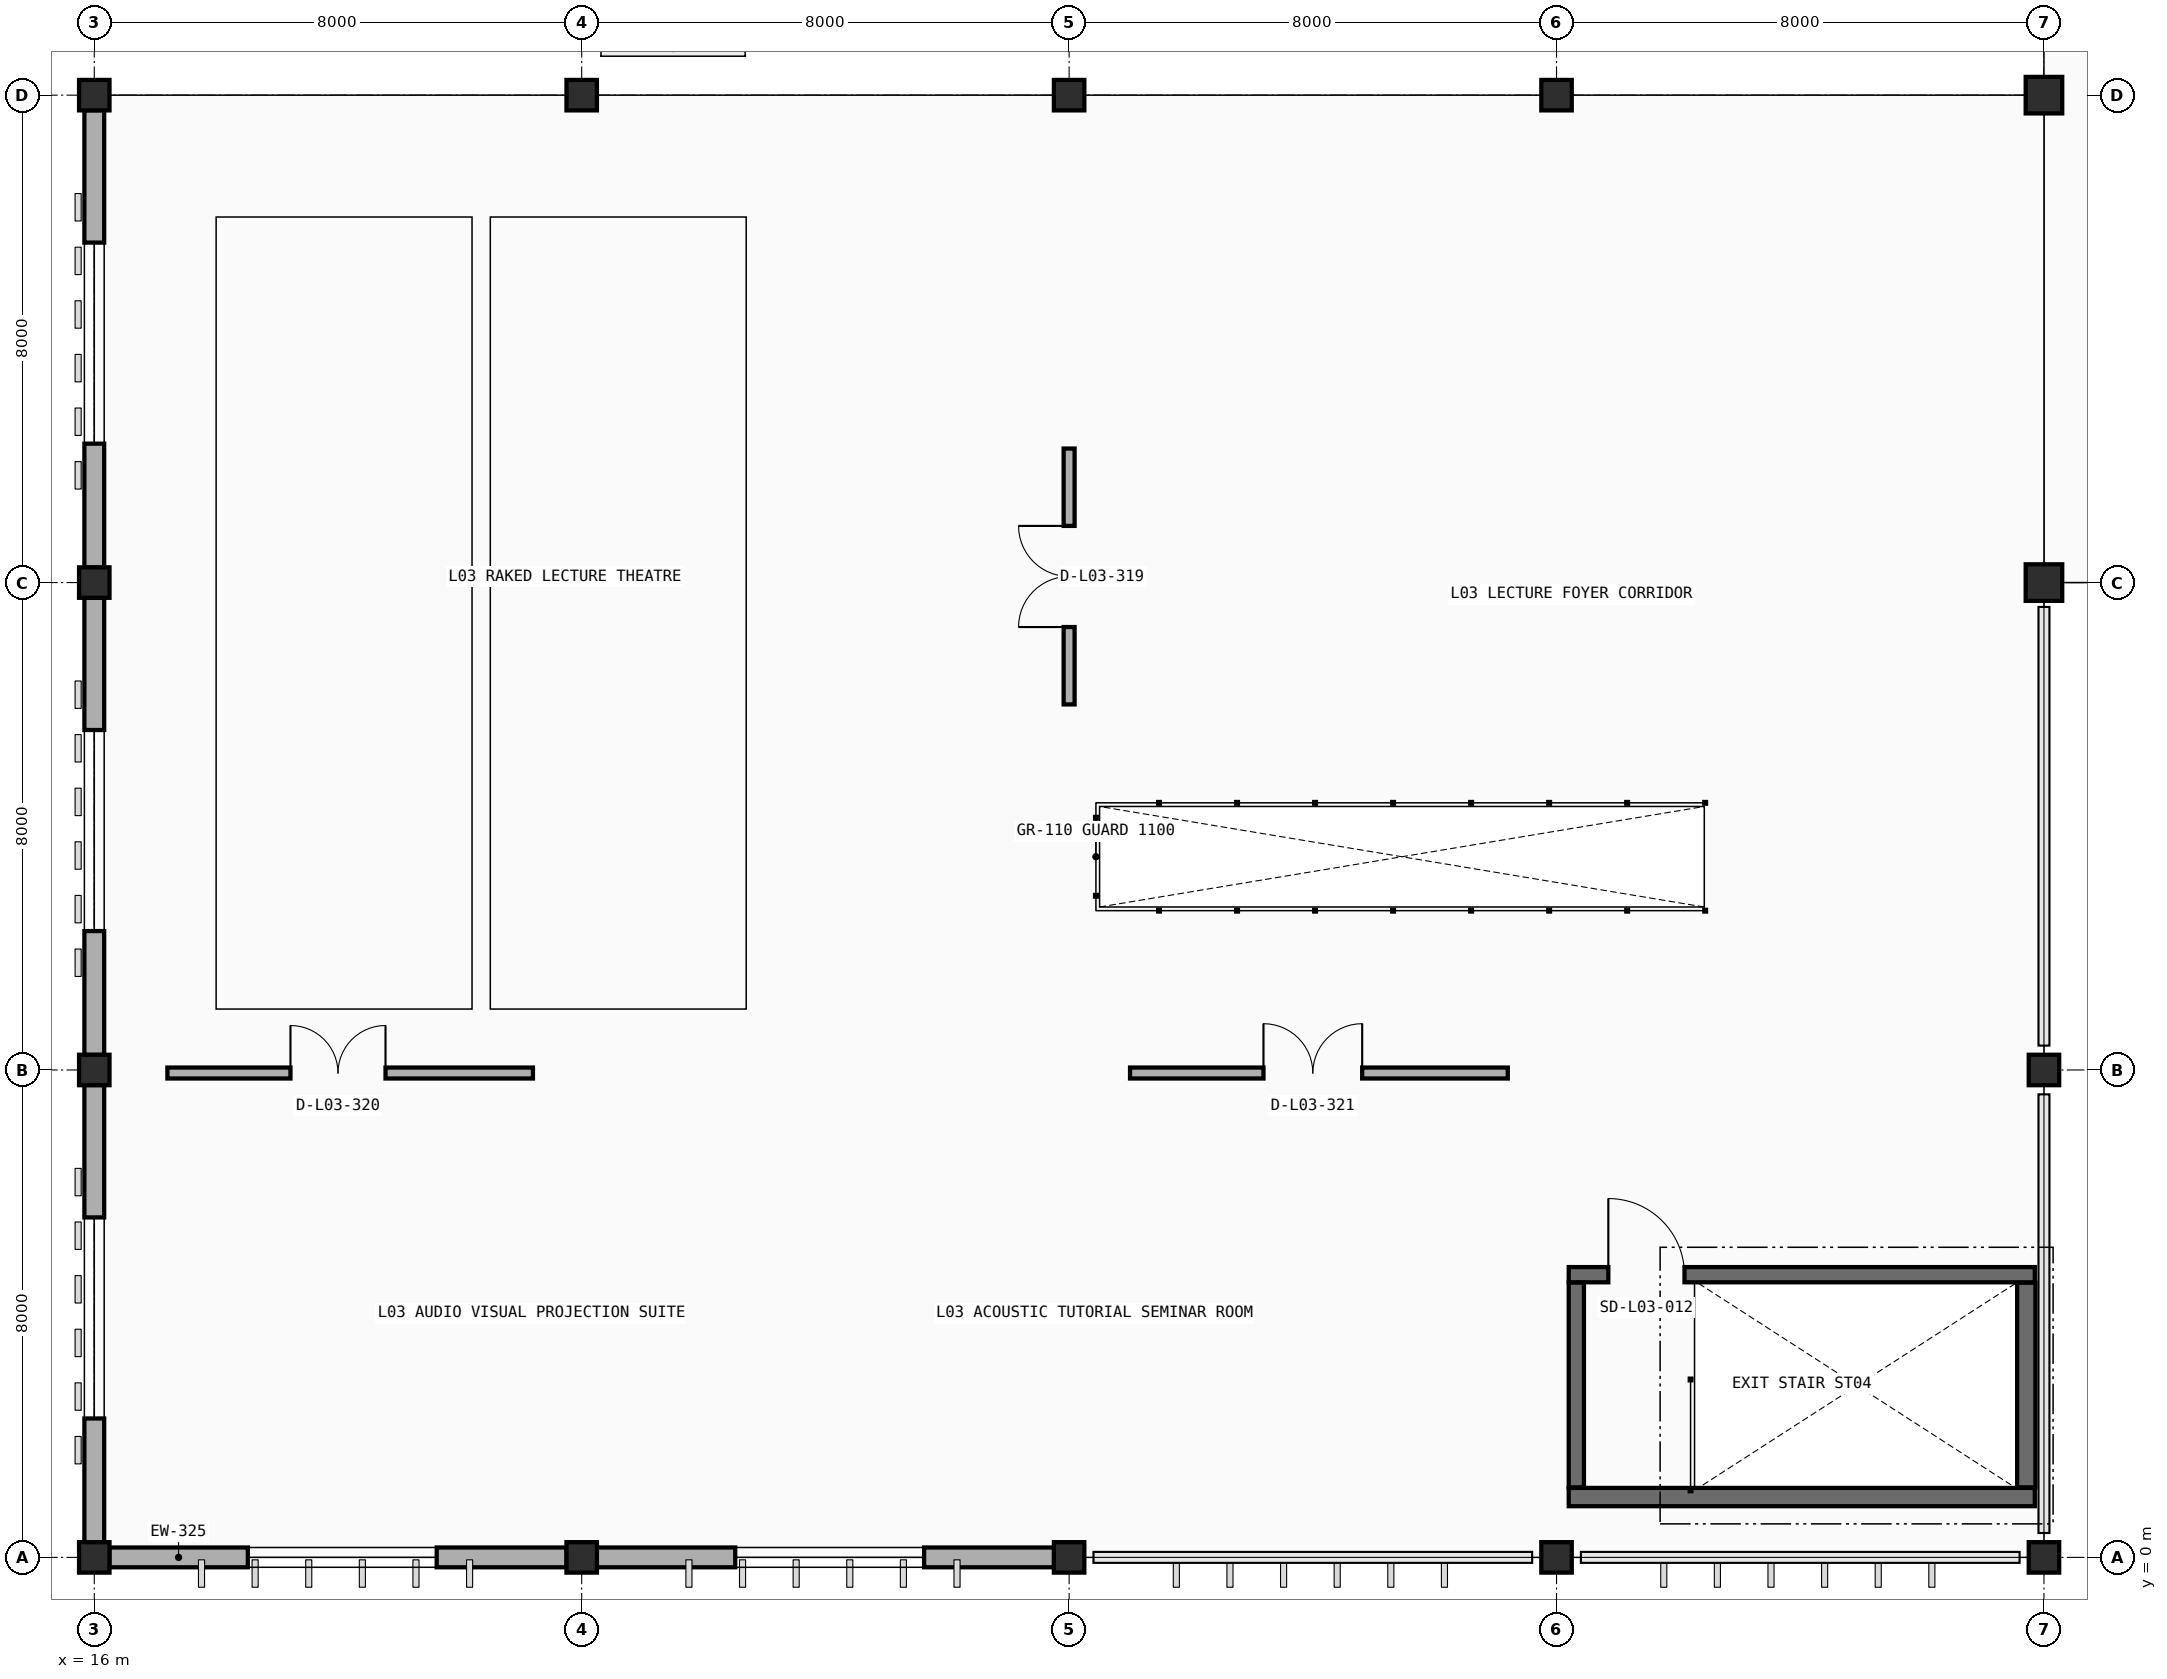
"""IFC4 building model, lengths in metres.
Left out: names, types, materials, properties, quantities, classifications, styles, units other than length and angle.
Written with IfcOpenShell. Run it as: python <this file> out.ifc"""

import sys

from ifc_helpers import new_model, si_unit, direction, frame, frame_2d, origin, origin_2d, place, context, subcontext, project, spatial, rectangle, extrude, element, fill, save


model = new_model("IFC4")
c1 = context("Model", 3, precision=1e-05, world=origin(), true_north=direction((0.0, 1.0)))
c2 = subcontext(c1, "Body", "Model", "MODEL_VIEW")
j1 = project(units=[si_unit("LENGTHUNIT", "METRE"), si_unit("PLANEANGLEUNIT", "RADIAN")], contexts=[c1])
p1 = place(None, origin())
s1 = spatial("IfcSite", under=j1, at=p1, CompositionType="ELEMENT")
p2 = place(p1, origin())
s2 = spatial("IfcBuilding", under=s1, at=p2, CompositionType="ELEMENT")
p3 = place(p2, frame((0.0, 0.0, 9.6)))
s3 = spatial("IfcBuildingStorey", under=s2, at=p3, CompositionType="ELEMENT", Elevation=9.6)
for number, where, z_axis, x_axis in (
    (1, (16.0, 0.0, 0.0), (0.0, 0.0, 1.0), (0.0, 1.0, 0.0)),
    (2, (24.0, 0.0, 0.0), (0.0, 0.0, 1.0), (0.0, 1.0, 0.0)),
    (3, (32.0, 0.0, 0.0), (0.0, 0.0, 1.0), (0.0, 1.0, 0.0)),
    (4, (40.0, 0.0, 0.0), (0.0, 0.0, 1.0), (0.0, 1.0, 0.0)),
    (5, (48.0, 0.0, 0.0), (0.0, 0.0, 1.0), (0.0, 1.0, 0.0)),
    (6, (16.0, 8.0, 0.0), (0.0, 0.0, 1.0), (0.0, 1.0, 0.0)),
    (7, (48.0, 8.0, 0.0), (0.0, 0.0, 1.0), (0.0, 1.0, 0.0)),
    (8, (16.0, 16.0, 0.0), (0.0, 0.0, 1.0), (0.0, 1.0, 0.0)),
):
    element("IfcColumn", number, at=place(p3, frame(where, z_axis=z_axis, x_axis=x_axis)), inside=s3, PredefinedType="COLUMN", context=c2, shape_type="SweptSolid", body=[
        extrude(rectangle(XDim=0.5, YDim=0.5, at=origin_2d()), origin(), (0.0, 0.0, 1.0), 4.2),
    ])
p4 = place(p3, frame((48.0, 16.0, 0.0), z_axis=(0.0, 0.0, 1.0), x_axis=(1.0, 0.0, 0.0)))
e9 = element("IfcColumn", 9, at=p4, inside=s3, PredefinedType="COLUMN", context=c2, shape_type="SweptSolid", body=[
    extrude(rectangle(XDim=0.6, YDim=0.6, at=origin_2d()), origin(), (0.0, 0.0, 1.0), 4.2),
])
for number, where, z_axis, x_axis in (
    (10, (16.0, 24.0, 0.0), (0.0, 0.0, 1.0), (0.0, 1.0, 0.0)),
    (11, (24.0, 24.0, 0.0), (0.0, 0.0, 1.0), (0.0, 1.0, 0.0)),
    (12, (32.0, 24.0, 0.0), (0.0, 0.0, 1.0), (0.0, 1.0, 0.0)),
    (13, (40.0, 24.0, 0.0), (0.0, 0.0, 1.0), (0.0, 1.0, 0.0)),
):
    element("IfcColumn", number, at=place(p3, frame(where, z_axis=z_axis, x_axis=x_axis)), inside=s3, PredefinedType="COLUMN", context=c2, shape_type="SweptSolid", body=[
        extrude(rectangle(XDim=0.5, YDim=0.5, at=origin_2d()), origin(), (0.0, 0.0, 1.0), 4.2),
    ])
p5 = place(p3, frame((48.0, 24.0, 0.0), z_axis=(0.0, 0.0, 1.0), x_axis=(1.0, 0.0, 0.0)))
e14 = element("IfcColumn", 14, at=p5, inside=s3, PredefinedType="COLUMN", context=c2, shape_type="SweptSolid", body=[
    extrude(rectangle(XDim=0.6, YDim=0.6, at=origin_2d()), origin(), (0.0, 0.0, 1.0), 4.2),
])
p6 = place(p3, frame((32.331, 26.009, 0.01), z_axis=(0.0, 0.0, 1.0), x_axis=(-0.9807810487, -0.19511159502, 0.0)))
e15 = element("IfcWall", 15, at=p6, inside=s3, PredefinedType="PARAPET", context=c2, shape_type="SweptSolid", body=[
    extrude(rectangle(XDim=6.965, YDim=0.2, at=frame_2d((3.482, 0.0))), origin(), (0.0, 0.0, 1.0), 1.62),
])
p7 = place(p3, frame((25.5, 24.65, 0.49), z_axis=(0.0, 0.0, 1.0), x_axis=(-0.9807810487, 0.19511159502, 0.0)))
e16 = element("IfcWall", 16, at=p7, inside=s3, PredefinedType="PARAPET", context=c2, shape_type="SweptSolid", body=[
    extrude(rectangle(XDim=6.965, YDim=0.2, at=frame_2d((3.482, 0.0))), origin(), (0.0, 0.0, 1.0), 1.5),
])
p8 = place(p3, frame((23.753, 0.0, 0.0), z_axis=(0.0, 0.0, 1.0), x_axis=(-1.0, 0.0, 0.0)))
e17 = element("IfcWall", 17, at=p8, inside=s3, PredefinedType="STANDARD", context=c2, shape_type="SweptSolid", body=[
    extrude(rectangle(XDim=7.506, YDim=0.325, at=frame_2d((3.753, 0.0))), origin(), (0.0, 0.0, 1.0), 3.35),
])
p9 = place(p8, frame((2.133, 0.0, 0.95)))
e18 = element("IfcOpeningElement", 18, at=p9, cuts=e17, PredefinedType="OPENING", context=c2, shape_type="SweptSolid", body=[
    extrude(rectangle(XDim=3.1, YDim=1.6, at=frame_2d((1.55, 0.8))), frame((0.0, 0.173, 0.0), z_axis=(0.0, -1.0, 0.0), x_axis=(1.0, 0.0, 0.0)), (0.0, 0.0, 1.0), 0.345),
])
p10 = place(p3, frame((31.753, 0.0, 0.0), z_axis=(0.0, 0.0, 1.0), x_axis=(-1.0, 0.0, 0.0)))
e19 = element("IfcWall", 19, at=p10, inside=s3, PredefinedType="STANDARD", context=c2, shape_type="SweptSolid", body=[
    extrude(rectangle(XDim=7.506, YDim=0.325, at=frame_2d((3.753, 0.0))), origin(), (0.0, 0.0, 1.0), 3.35),
])
p11 = place(p10, frame((2.133, 0.0, 0.95)))
e20 = element("IfcOpeningElement", 20, at=p11, cuts=e19, PredefinedType="OPENING", context=c2, shape_type="SweptSolid", body=[
    extrude(rectangle(XDim=3.1, YDim=1.6, at=frame_2d((1.55, 0.8))), frame((0.0, 0.173, 0.0), z_axis=(0.0, -1.0, 0.0), x_axis=(1.0, 0.0, 0.0)), (0.0, 0.0, 1.0), 0.345),
])
p12 = place(p3, frame((16.0, 0.247, 0.0), z_axis=(0.0, 0.0, 1.0), x_axis=(0.0, 1.0, 0.0)))
e21 = element("IfcWall", 21, at=p12, inside=s3, PredefinedType="STANDARD", context=c2, shape_type="SweptSolid", body=[
    extrude(rectangle(XDim=7.506, YDim=0.325, at=frame_2d((3.753, 0.0))), origin(), (0.0, 0.0, 1.0), 3.35),
])
p13 = place(p12, frame((2.033, 0.0, 0.95)))
e22 = element("IfcOpeningElement", 22, at=p13, cuts=e21, PredefinedType="OPENING", context=c2, shape_type="SweptSolid", body=[
    extrude(rectangle(XDim=3.3, YDim=1.75, at=frame_2d((1.65, 0.875))), frame((0.0, 0.173, 0.0), z_axis=(0.0, -1.0, 0.0), x_axis=(1.0, 0.0, 0.0)), (0.0, 0.0, 1.0), 0.345),
])
p14 = place(p3, frame((16.0, 8.247, 0.0), z_axis=(0.0, 0.0, 1.0), x_axis=(0.0, 1.0, 0.0)))
e23 = element("IfcWall", 23, at=p14, inside=s3, PredefinedType="STANDARD", context=c2, shape_type="SweptSolid", body=[
    extrude(rectangle(XDim=7.506, YDim=0.325, at=frame_2d((3.753, 0.0))), origin(), (0.0, 0.0, 1.0), 3.35),
])
p15 = place(p14, frame((2.033, 0.0, 0.95)))
e24 = element("IfcOpeningElement", 24, at=p15, cuts=e23, PredefinedType="OPENING", context=c2, shape_type="SweptSolid", body=[
    extrude(rectangle(XDim=3.3, YDim=1.75, at=frame_2d((1.65, 0.875))), frame((0.0, 0.173, 0.0), z_axis=(0.0, -1.0, 0.0), x_axis=(1.0, 0.0, 0.0)), (0.0, 0.0, 1.0), 0.345),
])
p16 = place(p3, frame((16.0, 16.247, 0.0), z_axis=(0.0, 0.0, 1.0), x_axis=(0.0, 1.0, 0.0)))
e25 = element("IfcWall", 25, at=p16, inside=s3, PredefinedType="STANDARD", context=c2, shape_type="SweptSolid", body=[
    extrude(rectangle(XDim=7.506, YDim=0.325, at=frame_2d((3.753, 0.0))), origin(), (0.0, 0.0, 1.0), 3.35),
])
p17 = place(p16, frame((2.033, 0.0, 0.95)))
e26 = element("IfcOpeningElement", 26, at=p17, cuts=e25, PredefinedType="OPENING", context=c2, shape_type="SweptSolid", body=[
    extrude(rectangle(XDim=3.3, YDim=1.75, at=frame_2d((1.65, 0.875))), frame((0.0, 0.173, 0.0), z_axis=(0.0, -1.0, 0.0), x_axis=(1.0, 0.0, 0.0)), (0.0, 0.0, 1.0), 0.345),
])
p18 = place(p3, frame((48.22, 0.1, 0.0), z_axis=(0.0, 0.0, 1.0), x_axis=(1.0, 0.0, 0.0)))
e27 = element("IfcWall", 27, at=p18, inside=s3, PredefinedType="PARAPET", context=c2, shape_type="SweptSolid", body=[
    extrude(rectangle(XDim=111.56, YDim=0.18, at=frame_2d((55.78, 0.0))), origin(), (0.0, 0.0, 1.0), 1.15),
])
p19 = place(p3, frame((48.25, 7.9, 0.0), z_axis=(0.0, 0.0, 1.0), x_axis=(1.0, 0.0, 0.0)))
e28 = element("IfcWall", 28, at=p19, inside=s3, PredefinedType="PARAPET", context=c2, shape_type="SweptSolid", body=[
    extrude(rectangle(XDim=7.35, YDim=0.18, at=frame_2d((3.675, 0.0))), origin(), (0.0, 0.0, 1.0), 1.15),
])
p20 = place(p3, frame((40.2, 0.99, 0.0), z_axis=(0.0, 0.0, 1.0), x_axis=(1.0, 0.0, 0.0)))
e29 = element("IfcWall", 29, at=p20, inside=s3, PredefinedType="SHEAR", context=c2, shape_type="SweptSolid", body=[
    extrude(rectangle(XDim=7.65, YDim=0.3, at=frame_2d((3.825, 0.0))), origin(), (0.0, 0.0, 1.0), 4.2),
])
p21 = place(p3, frame((47.71, 1.15, 0.0), z_axis=(0.0, 0.0, 1.0), x_axis=(0.0, 1.0, 0.0)))
e30 = element("IfcWall", 30, at=p21, inside=s3, PredefinedType="SHEAR", context=c2, shape_type="SweptSolid", body=[
    extrude(rectangle(XDim=3.36, YDim=0.3, at=frame_2d((1.68, 0.0))), origin(), (0.0, 0.0, 1.0), 4.2),
])
p22 = place(p3, frame((40.2, 4.64, 0.0), z_axis=(0.0, 0.0, 1.0), x_axis=(1.0, 0.0, 0.0)))
e31 = element("IfcWall", 31, at=p22, inside=s3, PredefinedType="SOLIDWALL", context=c2, shape_type="SweptSolid", body=[
    extrude(rectangle(XDim=7.65, YDim=0.25, at=frame_2d((3.825, 0.0))), origin(), (0.0, 0.0, 1.0), 4.2),
])
p23 = place(p22, frame((0.65, 0.0, 0.0)))
e32 = element("IfcOpeningElement", 32, at=p23, cuts=e31, PredefinedType="OPENING", context=c2, shape_type="SweptSolid", body=[
    extrude(rectangle(XDim=1.25, YDim=2.15, at=frame_2d((0.625, 1.075))), frame((0.0, 0.135, 0.0), z_axis=(0.0, -1.0, 0.0), x_axis=(1.0, 0.0, 0.0)), (0.0, 0.0, 1.0), 0.27),
])
p24 = place(p3, frame((40.325, 1.15, 0.0), z_axis=(0.0, 0.0, 1.0), x_axis=(0.0, 1.0, 0.0)))
e33 = element("IfcWall", 33, at=p24, inside=s3, PredefinedType="SOLIDWALL", context=c2, shape_type="SweptSolid", body=[
    extrude(rectangle(XDim=3.36, YDim=0.25, at=frame_2d((1.68, 0.0))), origin(), (0.0, 0.0, 1.0), 4.2),
])
p25 = place(p3, frame((32.0, 14.0, 0.0), z_axis=(0.0, 0.0, 1.0), x_axis=(0.0, 1.0, 0.0)))
e34 = element("IfcWall", 34, at=p25, inside=s3, PredefinedType="PARTITIONING", context=c2, shape_type="SweptSolid", body=[
    extrude(rectangle(XDim=4.2, YDim=0.18, at=frame_2d((2.1, 0.0))), origin(), (0.0, 0.0, 1.0), 3.3),
])
p26 = place(p25, frame((1.27, 0.0, 0.0)))
e35 = element("IfcOpeningElement", 35, at=p26, cuts=e34, PredefinedType="OPENING", context=c2, shape_type="SweptSolid", body=[
    extrude(rectangle(XDim=1.66, YDim=2.22, at=frame_2d((0.83, 1.11))), frame((0.0, 0.1, 0.0), z_axis=(0.0, -1.0, 0.0), x_axis=(1.0, 0.0, 0.0)), (0.0, 0.0, 1.0), 0.2),
])
p27 = place(p3, frame((17.2, 7.95, 0.0), z_axis=(0.0, 0.0, 1.0), x_axis=(1.0, 0.0, 0.0)))
e36 = element("IfcWall", 36, at=p27, inside=s3, PredefinedType="PARTITIONING", context=c2, shape_type="SweptSolid", body=[
    extrude(rectangle(XDim=6.0, YDim=0.18, at=frame_2d((3.0, 0.0))), origin(), (0.0, 0.0, 1.0), 3.3),
])
p28 = place(p27, frame((2.02, 0.0, 0.0)))
e37 = element("IfcOpeningElement", 37, at=p28, cuts=e36, PredefinedType="OPENING", context=c2, shape_type="SweptSolid", body=[
    extrude(rectangle(XDim=1.56, YDim=2.2, at=frame_2d((0.78, 1.1))), frame((0.0, 0.1, 0.0), z_axis=(0.0, -1.0, 0.0), x_axis=(1.0, 0.0, 0.0)), (0.0, 0.0, 1.0), 0.2),
])
p29 = place(p3, frame((33.0, 7.95, 0.0), z_axis=(0.0, 0.0, 1.0), x_axis=(1.0, 0.0, 0.0)))
e38 = element("IfcWall", 38, at=p29, inside=s3, PredefinedType="PARTITIONING", context=c2, shape_type="SweptSolid", body=[
    extrude(rectangle(XDim=6.2, YDim=0.18, at=frame_2d((3.1, 0.0))), origin(), (0.0, 0.0, 1.0), 3.3),
])
p30 = place(p29, frame((2.19, 0.0, 0.0)))
e39 = element("IfcOpeningElement", 39, at=p30, cuts=e38, PredefinedType="OPENING", context=c2, shape_type="SweptSolid", body=[
    extrude(rectangle(XDim=1.62, YDim=2.2, at=frame_2d((0.81, 1.1))), frame((0.0, 0.1, 0.0), z_axis=(0.0, -1.0, 0.0), x_axis=(1.0, 0.0, 0.0)), (0.0, 0.0, 1.0), 0.2),
])
p31 = place(p9, origin())
e40 = element("IfcWindow", 40, at=p31, inside=s3, PartitioningType="DOUBLE_PANEL_VERTICAL", PredefinedType="WINDOW", context=c2, shape_type="SweptSolid", body=[
    extrude(rectangle(XDim=3.1, YDim=1.6, at=frame_2d((1.55, 0.8))), frame((0.0, 0.03, 0.0), z_axis=(0.0, -1.0, 0.0), x_axis=(1.0, 0.0, 0.0)), (0.0, 0.0, 1.0), 0.06),
])
fill(e18, e40)
p32 = place(p11, origin())
e41 = element("IfcWindow", 41, at=p32, inside=s3, PartitioningType="DOUBLE_PANEL_VERTICAL", PredefinedType="WINDOW", context=c2, shape_type="SweptSolid", body=[
    extrude(rectangle(XDim=3.1, YDim=1.6, at=frame_2d((1.55, 0.8))), frame((0.0, 0.03, 0.0), z_axis=(0.0, -1.0, 0.0), x_axis=(1.0, 0.0, 0.0)), (0.0, 0.0, 1.0), 0.06),
])
fill(e20, e41)
p33 = place(p13, origin())
e42 = element("IfcWindow", 42, at=p33, inside=s3, PartitioningType="DOUBLE_PANEL_VERTICAL", PredefinedType="WINDOW", context=c2, shape_type="SweptSolid", body=[
    extrude(rectangle(XDim=3.3, YDim=1.75, at=frame_2d((1.65, 0.875))), frame((0.0, 0.03, 0.0), z_axis=(0.0, -1.0, 0.0), x_axis=(1.0, 0.0, 0.0)), (0.0, 0.0, 1.0), 0.06),
])
fill(e22, e42)
p34 = place(p15, origin())
e43 = element("IfcWindow", 43, at=p34, inside=s3, PartitioningType="DOUBLE_PANEL_VERTICAL", PredefinedType="WINDOW", context=c2, shape_type="SweptSolid", body=[
    extrude(rectangle(XDim=3.3, YDim=1.75, at=frame_2d((1.65, 0.875))), frame((0.0, 0.03, 0.0), z_axis=(0.0, -1.0, 0.0), x_axis=(1.0, 0.0, 0.0)), (0.0, 0.0, 1.0), 0.06),
])
fill(e24, e43)
p35 = place(p17, origin())
e44 = element("IfcWindow", 44, at=p35, inside=s3, PartitioningType="DOUBLE_PANEL_VERTICAL", PredefinedType="WINDOW", context=c2, shape_type="SweptSolid", body=[
    extrude(rectangle(XDim=3.3, YDim=1.75, at=frame_2d((1.65, 0.875))), frame((0.0, 0.03, 0.0), z_axis=(0.0, -1.0, 0.0), x_axis=(1.0, 0.0, 0.0)), (0.0, 0.0, 1.0), 0.06),
])
fill(e26, e44)
p36 = place(p23, origin())
e45 = element("IfcDoor", 45, at=p36, inside=s3, OperationType="SINGLE_SWING_LEFT", PredefinedType="DOOR", context=c2, shape_type="SweptSolid", body=[
    extrude(rectangle(XDim=1.25, YDim=2.15, at=frame_2d((0.625, 1.075))), frame((0.0, 0.025, 0.0), z_axis=(0.0, -1.0, 0.0), x_axis=(1.0, 0.0, 0.0)), (0.0, 0.0, 1.0), 0.05),
])
fill(e32, e45)
p37 = place(p26, origin())
e46 = element("IfcDoor", 46, at=p37, inside=s3, OperationType="DOUBLE_DOOR_SINGLE_SWING", PredefinedType="DOOR", context=c2, shape_type="SweptSolid", body=[
    extrude(rectangle(XDim=1.66, YDim=2.22, at=frame_2d((0.83, 1.11))), frame((0.0, 0.025, 0.0), z_axis=(0.0, -1.0, 0.0), x_axis=(1.0, 0.0, 0.0)), (0.0, 0.0, 1.0), 0.05),
])
fill(e35, e46)
p38 = place(p28, origin())
e47 = element("IfcDoor", 47, at=p38, inside=s3, OperationType="DOUBLE_DOOR_SINGLE_SWING", PredefinedType="DOOR", context=c2, shape_type="SweptSolid", body=[
    extrude(rectangle(XDim=1.56, YDim=2.2, at=frame_2d((0.78, 1.1))), frame((0.0, 0.025, 0.0), z_axis=(0.0, -1.0, 0.0), x_axis=(1.0, 0.0, 0.0)), (0.0, 0.0, 1.0), 0.05),
])
fill(e37, e47)
p39 = place(p30, origin())
e48 = element("IfcDoor", 48, at=p39, inside=s3, OperationType="DOUBLE_DOOR_SINGLE_SWING", PredefinedType="DOOR", context=c2, shape_type="SweptSolid", body=[
    extrude(rectangle(XDim=1.62, YDim=2.2, at=frame_2d((0.81, 1.1))), frame((0.0, 0.025, 0.0), z_axis=(0.0, -1.0, 0.0), x_axis=(1.0, 0.0, 0.0)), (0.0, 0.0, 1.0), 0.05),
])
fill(e39, e48)
save(model, sys.argv[1])
